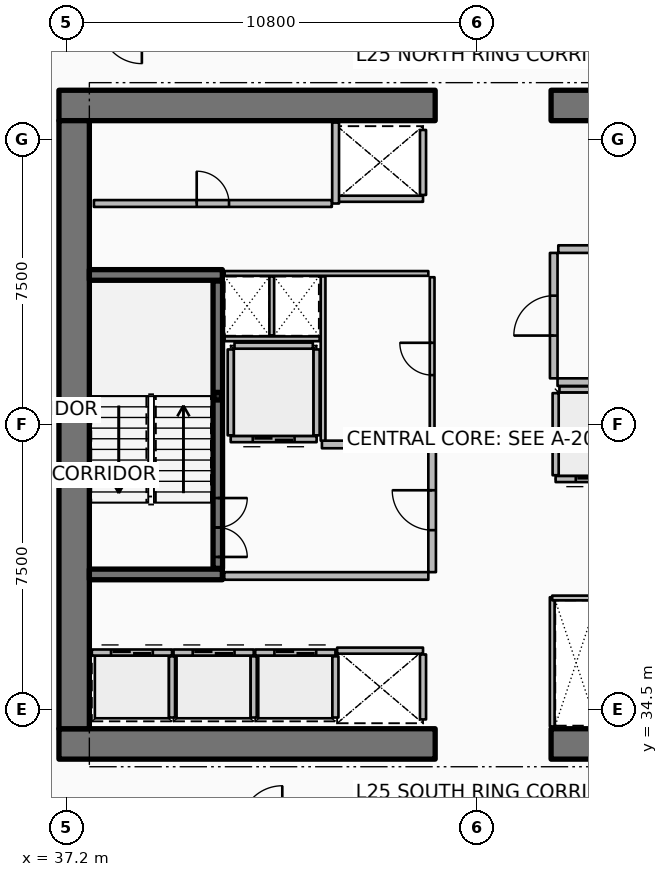
"""IFC4 building model, lengths in metres.
Left out: names, types, materials, properties, quantities, classifications, styles, units other than length and angle.
Written with IfcOpenShell. Run it as: python <this file> out.ifc"""

import sys

from ifc_helpers import new_model, si_unit, direction, frame, frame_2d, origin, origin_2d, place, context, subcontext, project, spatial, rectangle, hollow_rectangle, extrude, element, fill, save


model = new_model("IFC4")
c1 = context("Model", 3, precision=1e-05, world=origin(), true_north=direction((0.0, 1.0)))
c2 = subcontext(c1, "Body", "Model", "MODEL_VIEW")
j1 = project(units=[si_unit("LENGTHUNIT", "METRE"), si_unit("PLANEANGLEUNIT", "RADIAN")], contexts=[c1])
p1 = place(None, origin())
s1 = spatial("IfcSite", under=j1, at=p1, CompositionType="ELEMENT")
p2 = place(p1, origin())
s2 = spatial("IfcBuilding", under=s1, at=p2, CompositionType="ELEMENT")
p3 = place(p2, frame((0.0, 0.0, 101.4)))
s3 = spatial("IfcBuildingStorey", under=s2, at=p3, CompositionType="ELEMENT", Elevation=101.4)
p4 = place(p3, frame((37.0, 33.6, 0.0), z_axis=(0.0, 0.0, 1.0), x_axis=(1.0, 0.0, 0.0)))
e1 = element("IfcWall", 1, at=p4, inside=s3, PredefinedType="SHEAR", context=c2, shape_type="SweptSolid", body=[
    extrude(rectangle(XDim=9.9, YDim=0.8, at=frame_2d((4.95, 0.0))), origin(), (0.0, 0.0, 1.0), 3.75),
])
p5 = place(p3, frame((49.95, 33.6, 0.0), z_axis=(0.0, 0.0, 1.0), x_axis=(1.0, 0.0, 0.0)))
e2 = element("IfcWall", 2, at=p5, inside=s3, PredefinedType="SHEAR", context=c2, shape_type="SweptSolid", body=[
    extrude(rectangle(XDim=9.9, YDim=0.8, at=frame_2d((4.95, 0.0))), origin(), (0.0, 0.0, 1.0), 3.75),
])
p6 = place(p3, frame((37.0, 50.4, 0.0), z_axis=(0.0, 0.0, 1.0), x_axis=(1.0, 0.0, 0.0)))
e3 = element("IfcWall", 3, at=p6, inside=s3, PredefinedType="SHEAR", context=c2, shape_type="SweptSolid", body=[
    extrude(rectangle(XDim=9.9, YDim=0.8, at=frame_2d((4.95, 0.0))), origin(), (0.0, 0.0, 1.0), 3.75),
])
p7 = place(p3, frame((49.95, 50.4, 0.0), z_axis=(0.0, 0.0, 1.0), x_axis=(1.0, 0.0, 0.0)))
e4 = element("IfcWall", 4, at=p7, inside=s3, PredefinedType="SHEAR", context=c2, shape_type="SweptSolid", body=[
    extrude(rectangle(XDim=9.9, YDim=0.8, at=frame_2d((4.95, 0.0))), origin(), (0.0, 0.0, 1.0), 3.75),
])
p8 = place(p3, frame((37.4, 34.0, 0.0), z_axis=(0.0, 0.0, 1.0), x_axis=(0.0, 1.0, 0.0)))
e5 = element("IfcWall", 5, at=p8, inside=s3, PredefinedType="SHEAR", context=c2, shape_type="SweptSolid", body=[
    extrude(rectangle(XDim=16.0, YDim=0.8, at=frame_2d((8.0, 0.0))), origin(), (0.0, 0.0, 1.0), 3.75),
])
for number, where, z_axis, x_axis in (
    (6, (37.8, 38.06, 0.0), (0.0, 0.0, 1.0), (1.0, 0.0, 0.0)),
    (7, (37.8, 45.94, 0.0), (0.0, 0.0, 1.0), (1.0, 0.0, 0.0)),
):
    element("IfcWall", number, at=place(p3, frame(where, z_axis=z_axis, x_axis=x_axis)), inside=s3, PredefinedType="SHEAR", context=c2, shape_type="SweptSolid", body=[
        extrude(rectangle(XDim=3.5, YDim=0.28, at=frame_2d((1.75, 0.0))), origin(), (0.0, 0.0, 1.0), 3.75),
    ])
p9 = place(p3, frame((41.18, 42.75, 0.0), z_axis=(0.0, 0.0, 1.0), x_axis=(1.0, 0.0, 0.0)))
e8 = element("IfcColumn", 8, at=p9, inside=s3, PredefinedType="COLUMN", context=c2, shape_type="SweptSolid", body=[
    extrude(hollow_rectangle(XDim=0.2, YDim=0.2, WallThickness=0.01, InnerFilletRadius=0.01, OuterFilletRadius=0.02, at=origin_2d()), origin(), (0.0, 0.0, 1.0), 1.67),
])
p10 = place(p3, frame((41.18, 38.22, 0.0), z_axis=(0.0, 0.0, 1.0), x_axis=(0.0, 1.0, 0.0)))
e9 = element("IfcWall", 9, at=p10, inside=s3, PredefinedType="SOLIDWALL", context=c2, shape_type="SweptSolid", body=[
    extrude(rectangle(XDim=7.56, YDim=0.25, at=frame_2d((3.78, 0.0))), origin(), (0.0, 0.0, 1.0), 3.5),
])
p11 = place(p10, frame((0.3, 0.0, 0.0)))
e10 = element("IfcOpeningElement", 10, at=p11, cuts=e9, PredefinedType="OPENING", context=c2, shape_type="SweptSolid", body=[
    extrude(rectangle(XDim=1.55, YDim=2.15, at=frame_2d((0.775, 1.075))), frame((0.0, 0.135, 0.0), z_axis=(0.0, -1.0, 0.0), x_axis=(1.0, 0.0, 0.0)), (0.0, 0.0, 1.0), 0.27),
])
p12 = place(p3, frame((37.865, 36.005, 0.0), z_axis=(0.0, 0.0, 1.0), x_axis=(1.0, 0.0, 0.0)))
e11 = element("IfcWall", 11, at=p12, inside=s3, PredefinedType="PARTITIONING", context=c2, shape_type="SweptSolid", body=[
    extrude(rectangle(XDim=2.11, YDim=0.16, at=frame_2d((1.055, 0.0))), origin(), (0.0, 0.0, 1.0), 3.5),
])
p13 = place(p12, frame((0.505, 0.0, 0.0)))
e12 = element("IfcOpeningElement", 12, at=p13, cuts=e11, PredefinedType="OPENING", context=c2, shape_type="SweptSolid", body=[
    extrude(rectangle(XDim=1.1, YDim=2.1, at=frame_2d((0.55, 1.05))), frame((0.0, 0.09, 0.0), z_axis=(0.0, -1.0, 0.0), x_axis=(1.0, 0.0, 0.0)), (0.0, 0.0, 1.0), 0.18),
])
p14 = place(p3, frame((39.975, 34.295, 0.0), z_axis=(0.0, 0.0, 1.0), x_axis=(0.0, 1.0, 0.0)))
e13 = element("IfcWall", 13, at=p14, inside=s3, PredefinedType="PARTITIONING", context=c2, shape_type="SweptSolid", body=[
    extrude(rectangle(XDim=1.61, YDim=0.16, at=frame_2d((0.805, 0.0))), origin(), (0.0, 0.0, 1.0), 3.5),
])
p15 = place(p3, frame((40.015, 36.005, 0.0), z_axis=(0.0, 0.0, 1.0), x_axis=(1.0, 0.0, 0.0)))
e14 = element("IfcWall", 14, at=p15, inside=s3, PredefinedType="PARTITIONING", context=c2, shape_type="SweptSolid", body=[
    extrude(rectangle(XDim=2.11, YDim=0.16, at=frame_2d((1.055, 0.0))), origin(), (0.0, 0.0, 1.0), 3.5),
])
p16 = place(p15, frame((0.505, 0.0, 0.0)))
e15 = element("IfcOpeningElement", 15, at=p16, cuts=e14, PredefinedType="OPENING", context=c2, shape_type="SweptSolid", body=[
    extrude(rectangle(XDim=1.1, YDim=2.1, at=frame_2d((0.55, 1.05))), frame((0.0, 0.09, 0.0), z_axis=(0.0, -1.0, 0.0), x_axis=(1.0, 0.0, 0.0)), (0.0, 0.0, 1.0), 0.18),
])
p17 = place(p3, frame((42.125, 34.295, 0.0), z_axis=(0.0, 0.0, 1.0), x_axis=(0.0, 1.0, 0.0)))
e16 = element("IfcWall", 16, at=p17, inside=s3, PredefinedType="PARTITIONING", context=c2, shape_type="SweptSolid", body=[
    extrude(rectangle(XDim=1.61, YDim=0.16, at=frame_2d((0.805, 0.0))), origin(), (0.0, 0.0, 1.0), 3.5),
])
p18 = place(p3, frame((42.165, 36.005, 0.0), z_axis=(0.0, 0.0, 1.0), x_axis=(1.0, 0.0, 0.0)))
e17 = element("IfcWall", 17, at=p18, inside=s3, PredefinedType="PARTITIONING", context=c2, shape_type="SweptSolid", body=[
    extrude(rectangle(XDim=2.11, YDim=0.16, at=frame_2d((1.055, 0.0))), origin(), (0.0, 0.0, 1.0), 3.5),
])
p19 = place(p18, frame((0.505, 0.0, 0.0)))
e18 = element("IfcOpeningElement", 18, at=p19, cuts=e17, PredefinedType="OPENING", context=c2, shape_type="SweptSolid", body=[
    extrude(rectangle(XDim=1.1, YDim=2.1, at=frame_2d((0.55, 1.05))), frame((0.0, 0.09, 0.0), z_axis=(0.0, -1.0, 0.0), x_axis=(1.0, 0.0, 0.0)), (0.0, 0.0, 1.0), 0.18),
])
p20 = place(p3, frame((44.275, 34.295, 0.0), z_axis=(0.0, 0.0, 1.0), x_axis=(0.0, 1.0, 0.0)))
e19 = element("IfcWall", 19, at=p20, inside=s3, PredefinedType="PARTITIONING", context=c2, shape_type="SweptSolid", body=[
    extrude(rectangle(XDim=1.61, YDim=0.16, at=frame_2d((0.805, 0.0))), origin(), (0.0, 0.0, 1.0), 3.5),
])
p21 = place(p3, frame((46.58, 47.945, 0.0), z_axis=(0.0, 0.0, 1.0), x_axis=(-1.0, 0.0, 0.0)))
e20 = element("IfcWall", 20, at=p21, inside=s3, PredefinedType="PARTITIONING", context=c2, shape_type="SweptSolid", body=[
    extrude(rectangle(XDim=2.26, YDim=0.16, at=frame_2d((1.13, 0.0))), origin(), (0.0, 0.0, 1.0), 3.5),
])
p22 = place(p3, frame((46.58, 48.045, 0.0), z_axis=(0.0, 0.0, 1.0), x_axis=(0.0, 1.0, 0.0)))
e21 = element("IfcWall", 21, at=p22, inside=s3, PredefinedType="PARTITIONING", context=c2, shape_type="SweptSolid", body=[
    extrude(rectangle(XDim=1.71, YDim=0.16, at=frame_2d((0.855, 0.0))), origin(), (0.0, 0.0, 1.0), 3.5),
])
p23 = place(p3, frame((44.32, 36.055, 0.0), z_axis=(0.0, 0.0, 1.0), x_axis=(1.0, 0.0, 0.0)))
e22 = element("IfcWall", 22, at=p23, inside=s3, PredefinedType="PARTITIONING", context=c2, shape_type="SweptSolid", body=[
    extrude(rectangle(XDim=2.26, YDim=0.16, at=frame_2d((1.13, 0.0))), origin(), (0.0, 0.0, 1.0), 3.5),
])
p24 = place(p3, frame((46.58, 34.245, 0.0), z_axis=(0.0, 0.0, 1.0), x_axis=(0.0, 1.0, 0.0)))
e23 = element("IfcWall", 23, at=p24, inside=s3, PredefinedType="PARTITIONING", context=c2, shape_type="SweptSolid", body=[
    extrude(rectangle(XDim=1.71, YDim=0.16, at=frame_2d((0.855, 0.0))), origin(), (0.0, 0.0, 1.0), 3.5),
])
p25 = place(p3, frame((43.78, 41.62, 0.0), z_axis=(0.0, 0.0, 1.0), x_axis=(-1.0, 0.0, 0.0)))
e24 = element("IfcWall", 24, at=p25, inside=s3, PredefinedType="PARTITIONING", context=c2, shape_type="SweptSolid", body=[
    extrude(rectangle(XDim=2.26, YDim=0.16, at=frame_2d((1.13, 0.0))), origin(), (0.0, 0.0, 1.0), 3.5),
])
p26 = place(p25, frame((0.58, 0.0, 0.0)))
e25 = element("IfcOpeningElement", 25, at=p26, cuts=e24, PredefinedType="OPENING", context=c2, shape_type="SweptSolid", body=[
    extrude(rectangle(XDim=1.1, YDim=2.1, at=frame_2d((0.55, 1.05))), frame((0.0, 0.09, 0.0), z_axis=(0.0, -1.0, 0.0), x_axis=(1.0, 0.0, 0.0)), (0.0, 0.0, 1.0), 0.18),
])
for number, where, z_axis, x_axis in (
    (26, (43.78, 41.72, 0.0), (0.0, 0.0, 1.0), (0.0, 1.0, 0.0)),
    (27, (41.52, 41.72, 0.0), (0.0, 0.0, 1.0), (0.0, 1.0, 0.0)),
):
    element("IfcWall", number, at=place(p3, frame(where, z_axis=z_axis, x_axis=x_axis)), inside=s3, PredefinedType="PARTITIONING", context=c2, shape_type="SweptSolid", body=[
        extrude(rectangle(XDim=2.26, YDim=0.16, at=frame_2d((1.13, 0.0))), origin(), (0.0, 0.0, 1.0), 3.5),
    ])
p27 = place(p3, frame((41.62, 44.08, 0.0), z_axis=(0.0, 0.0, 1.0), x_axis=(1.0, 0.0, 0.0)))
e28 = element("IfcWall", 28, at=p27, inside=s3, PredefinedType="PARTITIONING", context=c2, shape_type="SweptSolid", body=[
    extrude(rectangle(XDim=2.06, YDim=0.16, at=frame_2d((1.03, 0.0))), origin(), (0.0, 0.0, 1.0), 3.5),
])
p28 = place(p3, frame((52.23, 40.57, 0.0), z_axis=(0.0, 0.0, 1.0), x_axis=(-1.0, 0.0, 0.0)))
e29 = element("IfcWall", 29, at=p28, inside=s3, PredefinedType="PARTITIONING", context=c2, shape_type="SweptSolid", body=[
    extrude(rectangle(XDim=2.16, YDim=0.16, at=frame_2d((1.08, 0.0))), origin(), (0.0, 0.0, 1.0), 3.5),
])
p29 = place(p28, frame((0.53, 0.0, 0.0)))
e30 = element("IfcOpeningElement", 30, at=p29, cuts=e29, PredefinedType="OPENING", context=c2, shape_type="SweptSolid", body=[
    extrude(rectangle(XDim=1.1, YDim=2.1, at=frame_2d((0.55, 1.05))), frame((0.0, 0.09, 0.0), z_axis=(0.0, -1.0, 0.0), x_axis=(1.0, 0.0, 0.0)), (0.0, 0.0, 1.0), 0.18),
])
p30 = place(p3, frame((50.07, 40.67, 0.0), z_axis=(0.0, 0.0, 1.0), x_axis=(0.0, 1.0, 0.0)))
e31 = element("IfcWall", 31, at=p30, inside=s3, PredefinedType="PARTITIONING", context=c2, shape_type="SweptSolid", body=[
    extrude(rectangle(XDim=2.16, YDim=0.16, at=frame_2d((1.08, 0.0))), origin(), (0.0, 0.0, 1.0), 3.5),
])
p31 = place(p3, frame((50.17, 42.93, 0.0), z_axis=(0.0, 0.0, 1.0), x_axis=(1.0, 0.0, 0.0)))
e32 = element("IfcWall", 32, at=p31, inside=s3, PredefinedType="PARTITIONING", context=c2, shape_type="SweptSolid", body=[
    extrude(rectangle(XDim=1.96, YDim=0.16, at=frame_2d((0.98, 0.0))), origin(), (0.0, 0.0, 1.0), 3.5),
])
p32 = place(p3, frame((37.92, 47.82, 0.0), z_axis=(0.0, 0.0, 1.0), x_axis=(1.0, 0.0, 0.0)))
e33 = element("IfcWall", 33, at=p32, inside=s3, PredefinedType="PARTITIONING", context=c2, shape_type="SweptSolid", body=[
    extrude(rectangle(XDim=6.26, YDim=0.18, at=frame_2d((3.13, 0.0))), origin(), (0.0, 0.0, 1.0), 3.5),
])
p33 = place(p32, frame((2.705, 0.0, 0.0)))
e34 = element("IfcOpeningElement", 34, at=p33, cuts=e33, PredefinedType="OPENING", context=c2, shape_type="SweptSolid", body=[
    extrude(rectangle(XDim=0.85, YDim=2.06, at=frame_2d((0.425, 1.03))), frame((0.0, 0.1, 0.0), z_axis=(0.0, -1.0, 0.0), x_axis=(1.0, 0.0, 0.0)), (0.0, 0.0, 1.0), 0.2),
])
p34 = place(p3, frame((44.28, 47.82, 0.0), z_axis=(0.0, 0.0, 1.0), x_axis=(0.0, 1.0, 0.0)))
e35 = element("IfcWall", 35, at=p34, inside=s3, PredefinedType="PARTITIONING", context=c2, shape_type="SweptSolid", body=[
    extrude(rectangle(XDim=2.13, YDim=0.18, at=frame_2d((1.065, 0.0))), origin(), (0.0, 0.0, 1.0), 3.5),
])
p35 = place(p3, frame((41.35, 38.02, 0.0), z_axis=(0.0, 0.0, 1.0), x_axis=(1.0, 0.0, 0.0)))
e36 = element("IfcWall", 36, at=p35, inside=s3, PredefinedType="PARTITIONING", context=c2, shape_type="SweptSolid", body=[
    extrude(rectangle(XDim=5.37, YDim=0.2, at=frame_2d((2.685, 0.0))), origin(), (0.0, 0.0, 1.0), 3.5),
])
p36 = place(p3, frame((43.92, 41.48, 0.0), z_axis=(0.0, 0.0, 1.0), x_axis=(1.0, 0.0, 0.0)))
e37 = element("IfcWall", 37, at=p36, inside=s3, PredefinedType="PARTITIONING", context=c2, shape_type="SweptSolid", body=[
    extrude(rectangle(XDim=2.8, YDim=0.2, at=frame_2d((1.4, 0.0))), origin(), (0.0, 0.0, 1.0), 3.5),
])
p37 = place(p3, frame((46.82, 38.12, 0.0), z_axis=(0.0, 0.0, 1.0), x_axis=(0.0, 1.0, 0.0)))
e38 = element("IfcWall", 38, at=p37, inside=s3, PredefinedType="PARTITIONING", context=c2, shape_type="SweptSolid", body=[
    extrude(rectangle(XDim=3.26, YDim=0.2, at=frame_2d((1.63, 0.0))), origin(), (0.0, 0.0, 1.0), 3.5),
])
p38 = place(p37, frame((1.105, 0.0, 0.0)))
e39 = element("IfcOpeningElement", 39, at=p38, cuts=e38, PredefinedType="OPENING", context=c2, shape_type="SweptSolid", body=[
    extrude(rectangle(XDim=1.05, YDim=2.1, at=frame_2d((0.525, 1.05))), frame((0.0, 0.11, 0.0), z_axis=(0.0, -1.0, 0.0), x_axis=(1.0, 0.0, 0.0)), (0.0, 0.0, 1.0), 0.22),
])
p39 = place(p3, frame((50.12, 43.12, 0.0), z_axis=(0.0, 0.0, 1.0), x_axis=(1.0, 0.0, 0.0)))
e40 = element("IfcWall", 40, at=p39, inside=s3, PredefinedType="PARTITIONING", context=c2, shape_type="SweptSolid", body=[
    extrude(rectangle(XDim=8.88, YDim=0.2, at=frame_2d((4.44, 0.0))), origin(), (0.0, 0.0, 1.0), 3.5),
])
p40 = place(p3, frame((50.14, 46.62, 0.0), z_axis=(0.0, 0.0, 1.0), x_axis=(1.0, 0.0, 0.0)))
e41 = element("IfcWall", 41, at=p40, inside=s3, PredefinedType="PARTITIONING", context=c2, shape_type="SweptSolid", body=[
    extrude(rectangle(XDim=1.02, YDim=0.2, at=frame_2d((0.51, 0.0))), origin(), (0.0, 0.0, 1.0), 3.5),
])
p41 = place(p3, frame((50.02, 43.22, 0.0), z_axis=(0.0, 0.0, 1.0), x_axis=(0.0, 1.0, 0.0)))
e42 = element("IfcWall", 42, at=p41, inside=s3, PredefinedType="PARTITIONING", context=c2, shape_type="SweptSolid", body=[
    extrude(rectangle(XDim=3.3, YDim=0.2, at=frame_2d((1.65, 0.0))), origin(), (0.0, 0.0, 1.0), 3.5),
])
p42 = place(p41, frame((1.125, 0.0, 0.0)))
e43 = element("IfcOpeningElement", 43, at=p42, cuts=e42, PredefinedType="OPENING", context=c2, shape_type="SweptSolid", body=[
    extrude(rectangle(XDim=1.05, YDim=2.1, at=frame_2d((0.525, 1.05))), frame((0.0, 0.11, 0.0), z_axis=(0.0, -1.0, 0.0), x_axis=(1.0, 0.0, 0.0)), (0.0, 0.0, 1.0), 0.22),
])
p43 = place(p3, frame((41.36, 45.98, 0.0), z_axis=(0.0, 0.0, 1.0), x_axis=(1.0, 0.0, 0.0)))
e44 = element("IfcWall", 44, at=p43, inside=s3, PredefinedType="PARTITIONING", context=c2, shape_type="SweptSolid", body=[
    extrude(rectangle(XDim=5.36, YDim=0.125, at=frame_2d((2.68, 0.0))), origin(), (0.0, 0.0, 1.0), 2.94),
])
p44 = place(p3, frame((41.36, 44.26, 0.0), z_axis=(0.0, 0.0, 1.0), x_axis=(1.0, 0.0, 0.0)))
e45 = element("IfcWall", 45, at=p44, inside=s3, PredefinedType="PARTITIONING", context=c2, shape_type="SweptSolid", body=[
    extrude(rectangle(XDim=2.5, YDim=0.125, at=frame_2d((1.25, 0.0))), origin(), (0.0, 0.0, 1.0), 2.94),
])
p45 = place(p3, frame((42.6, 44.35, 0.0), z_axis=(0.0, 0.0, 1.0), x_axis=(0.0, 1.0, 0.0)))
e46 = element("IfcWall", 46, at=p45, inside=s3, PredefinedType="PARTITIONING", context=c2, shape_type="SweptSolid", body=[
    extrude(rectangle(XDim=1.55, YDim=0.125, at=frame_2d((0.775, 0.0))), origin(), (0.0, 0.0, 1.0), 2.94),
])
p46 = place(p3, frame((49.98, 34.06, 0.0), z_axis=(0.0, 0.0, 1.0), x_axis=(0.0, 1.0, 0.0)))
e47 = element("IfcWall", 47, at=p46, inside=s3, PredefinedType="PARTITIONING", context=c2, shape_type="SweptSolid", body=[
    extrude(rectangle(XDim=3.4, YDim=0.125, at=frame_2d((1.7, 0.0))), origin(), (0.0, 0.0, 1.0), 2.94),
])
p47 = place(p3, frame((49.98, 37.44, 0.0), z_axis=(0.0, 0.0, 1.0), x_axis=(1.0, 0.0, 0.0)))
e48 = element("IfcWall", 48, at=p47, inside=s3, PredefinedType="PARTITIONING", context=c2, shape_type="SweptSolid", body=[
    extrude(rectangle(XDim=1.26, YDim=0.125, at=frame_2d((0.63, 0.0))), origin(), (0.0, 0.0, 1.0), 2.94),
])
p48 = place(p3, frame((43.95, 41.58, 0.0), z_axis=(0.0, 0.0, 1.0), x_axis=(0.0, 1.0, 0.0)))
e49 = element("IfcWall", 49, at=p48, inside=s3, PredefinedType="PARTITIONING", context=c2, shape_type="SweptSolid", body=[
    extrude(rectangle(XDim=4.32, YDim=0.125, at=frame_2d((2.16, 0.0))), origin(), (0.0, 0.0, 1.0), 2.94),
])
p49 = place(p3, frame((46.82, 41.58, 0.0), z_axis=(0.0, 0.0, 1.0), x_axis=(0.0, 1.0, 0.0)))
e50 = element("IfcWall", 50, at=p49, inside=s3, PredefinedType="PARTITIONING", context=c2, shape_type="SweptSolid", body=[
    extrude(rectangle(XDim=4.3, YDim=0.125, at=frame_2d((2.15, 0.0))), origin(), (0.0, 0.0, 1.0), 2.94),
])
p50 = place(p49, frame((1.725, 0.0, 0.0)))
e51 = element("IfcOpeningElement", 51, at=p50, cuts=e50, PredefinedType="OPENING", context=c2, shape_type="SweptSolid", body=[
    extrude(rectangle(XDim=0.85, YDim=2.06, at=frame_2d((0.425, 1.03))), frame((0.0, 0.073, 0.0), z_axis=(0.0, -1.0, 0.0), x_axis=(1.0, 0.0, 0.0)), (0.0, 0.0, 1.0), 0.145),
])
p51 = place(p11, origin())
e52 = element("IfcDoor", 52, at=p51, inside=s3, OperationType="DOUBLE_DOOR_SINGLE_SWING", PredefinedType="DOOR", context=c2, shape_type="SweptSolid", body=[
    extrude(rectangle(XDim=1.55, YDim=2.15, at=frame_2d((0.775, 1.075))), frame((0.0, 0.025, 0.0), z_axis=(0.0, -1.0, 0.0), x_axis=(1.0, 0.0, 0.0)), (0.0, 0.0, 1.0), 0.05),
])
fill(e10, e52)
p52 = place(p13, origin())
e53 = element("IfcDoor", 53, at=p52, inside=s3, OperationType="DOUBLE_DOOR_SLIDING", PredefinedType="DOOR", context=c2, shape_type="SweptSolid", body=[
    extrude(rectangle(XDim=1.1, YDim=2.1, at=frame_2d((0.55, 1.05))), frame((0.0, 0.025, 0.0), z_axis=(0.0, -1.0, 0.0), x_axis=(1.0, 0.0, 0.0)), (0.0, 0.0, 1.0), 0.05),
])
fill(e12, e53)
p53 = place(p16, origin())
e54 = element("IfcDoor", 54, at=p53, inside=s3, OperationType="DOUBLE_DOOR_SLIDING", PredefinedType="DOOR", context=c2, shape_type="SweptSolid", body=[
    extrude(rectangle(XDim=1.1, YDim=2.1, at=frame_2d((0.55, 1.05))), frame((0.0, 0.025, 0.0), z_axis=(0.0, -1.0, 0.0), x_axis=(1.0, 0.0, 0.0)), (0.0, 0.0, 1.0), 0.05),
])
fill(e15, e54)
p54 = place(p19, origin())
e55 = element("IfcDoor", 55, at=p54, inside=s3, OperationType="DOUBLE_DOOR_SLIDING", PredefinedType="DOOR", context=c2, shape_type="SweptSolid", body=[
    extrude(rectangle(XDim=1.1, YDim=2.1, at=frame_2d((0.55, 1.05))), frame((0.0, 0.025, 0.0), z_axis=(0.0, -1.0, 0.0), x_axis=(1.0, 0.0, 0.0)), (0.0, 0.0, 1.0), 0.05),
])
fill(e18, e55)
p55 = place(p26, origin())
e56 = element("IfcDoor", 56, at=p55, inside=s3, OperationType="DOUBLE_DOOR_SLIDING", PredefinedType="DOOR", context=c2, shape_type="SweptSolid", body=[
    extrude(rectangle(XDim=1.1, YDim=2.1, at=frame_2d((0.55, 1.05))), frame((0.0, 0.025, 0.0), z_axis=(0.0, -1.0, 0.0), x_axis=(1.0, 0.0, 0.0)), (0.0, 0.0, 1.0), 0.05),
])
fill(e25, e56)
p56 = place(p29, origin())
e57 = element("IfcDoor", 57, at=p56, inside=s3, OperationType="DOUBLE_DOOR_SLIDING", PredefinedType="DOOR", context=c2, shape_type="SweptSolid", body=[
    extrude(rectangle(XDim=1.1, YDim=2.1, at=frame_2d((0.55, 1.05))), frame((0.0, 0.025, 0.0), z_axis=(0.0, -1.0, 0.0), x_axis=(1.0, 0.0, 0.0)), (0.0, 0.0, 1.0), 0.05),
])
fill(e30, e57)
p57 = place(p33, origin())
e58 = element("IfcDoor", 58, at=p57, inside=s3, OperationType="SINGLE_SWING_LEFT", PredefinedType="DOOR", context=c2, shape_type="SweptSolid", body=[
    extrude(rectangle(XDim=0.85, YDim=2.06, at=frame_2d((0.425, 1.03))), frame((0.0, 0.025, 0.0), z_axis=(0.0, -1.0, 0.0), x_axis=(1.0, 0.0, 0.0)), (0.0, 0.0, 1.0), 0.05),
])
fill(e34, e58)
p58 = place(p38, origin())
e59 = element("IfcDoor", 59, at=p58, inside=s3, OperationType="SINGLE_SWING_RIGHT", PredefinedType="DOOR", context=c2, shape_type="SweptSolid", body=[
    extrude(rectangle(XDim=1.05, YDim=2.1, at=frame_2d((0.525, 1.05))), frame((0.0, 0.025, 0.0), z_axis=(0.0, -1.0, 0.0), x_axis=(1.0, 0.0, 0.0)), (0.0, 0.0, 1.0), 0.05),
])
fill(e39, e59)
p59 = place(p42, origin())
e60 = element("IfcDoor", 60, at=p59, inside=s3, OperationType="SINGLE_SWING_LEFT", PredefinedType="DOOR", context=c2, shape_type="SweptSolid", body=[
    extrude(rectangle(XDim=1.05, YDim=2.1, at=frame_2d((0.525, 1.05))), frame((0.0, 0.025, 0.0), z_axis=(0.0, -1.0, 0.0), x_axis=(1.0, 0.0, 0.0)), (0.0, 0.0, 1.0), 0.05),
])
fill(e43, e60)
p60 = place(p50, origin())
e61 = element("IfcDoor", 61, at=p60, inside=s3, OperationType="SINGLE_SWING_RIGHT", PredefinedType="DOOR", context=c2, shape_type="SweptSolid", body=[
    extrude(rectangle(XDim=0.85, YDim=2.06, at=frame_2d((0.425, 1.03))), frame((0.0, 0.025, 0.0), z_axis=(0.0, -1.0, 0.0), x_axis=(1.0, 0.0, 0.0)), (0.0, 0.0, 1.0), 0.05),
])
fill(e51, e61)
save(model, sys.argv[1])
